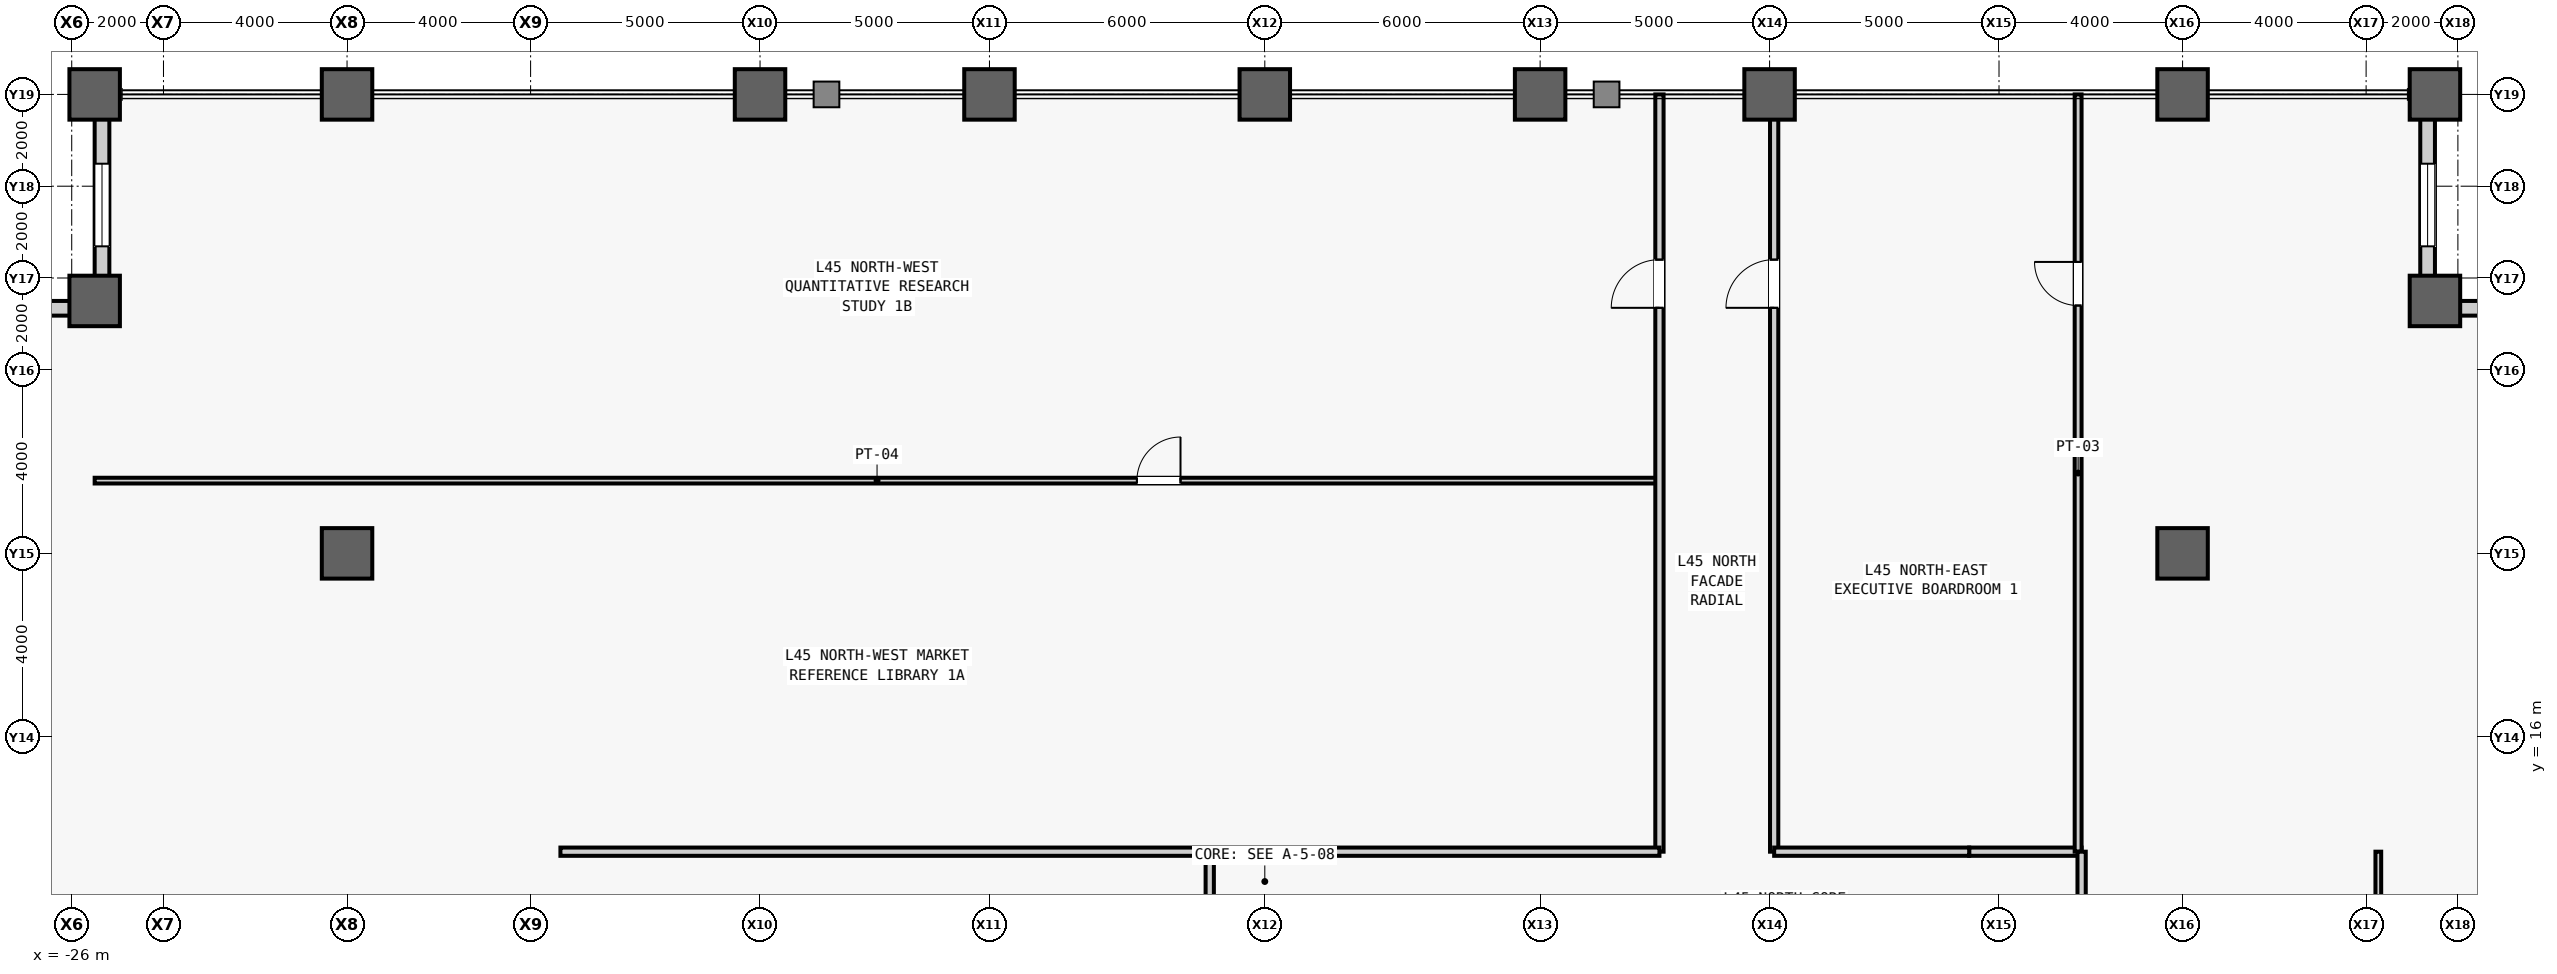
"""IFC4 building model, lengths in metres.
Left out: names, types, materials, properties, quantities, classifications, styles, units other than length and angle.
Written with IfcOpenShell. Run it as: python <this file> out.ifc"""

import sys

from ifc_helpers import new_model, si_unit, direction, frame, frame_2d, origin, origin_2d, place, context, subcontext, project, spatial, rectangle, hollow_rectangle, extrude, source, transform, mapped, element, fill, save


model = new_model("IFC4")
c1 = context("Model", 3, precision=1e-05, world=origin(), true_north=direction((0.0, 1.0)))
c2 = subcontext(c1, "Body", "Model", "MODEL_VIEW")
j1 = project(units=[si_unit("LENGTHUNIT", "METRE"), si_unit("PLANEANGLEUNIT", "RADIAN")], contexts=[c1])
p1 = place(None, origin())
s1 = spatial("IfcSite", under=j1, at=p1, CompositionType="ELEMENT")
p2 = place(p1, origin())
s2 = spatial("IfcBuilding", under=s1, at=p2, CompositionType="ELEMENT")
p3 = place(p2, frame((0.0, 0.0, 195.1)))
s3 = spatial("IfcBuildingStorey", under=s2, at=p3, CompositionType="ELEMENT", Elevation=195.1)
m1 = source(origin(), c2, "Body", "SweptSolid", [
    extrude(hollow_rectangle(XDim=1.1, YDim=1.1, WallThickness=0.06, at=origin_2d()), origin(), (0.0, 0.0, 1.0), 4.0),
])
for number, where, z_axis, x_axis in (
    (1, (-25.5, 25.5, 0.0), (0.0, 0.0, 1.0), (1.0, 0.0, 0.0)),
    (2, (-25.5, 30.0, 0.0), (0.0, 0.0, 1.0), (1.0, 0.0, 0.0)),
    (3, (-20.0, 20.0, 0.0), (0.0, 0.0, 1.0), (1.0, 0.0, 0.0)),
    (4, (-20.0, 30.0, 0.0), (0.0, 0.0, 1.0), (1.0, 0.0, 0.0)),
    (5, (-11.0, 30.0, 0.0), (0.0, 0.0, 1.0), (1.0, 0.0, 0.0)),
    (6, (-6.0, 30.0, 0.0), (0.0, 0.0, 1.0), (1.0, 0.0, 0.0)),
    (7, (0.0, 30.0, 0.0), (0.0, 0.0, 1.0), (1.0, 0.0, 0.0)),
    (8, (6.0, 30.0, 0.0), (0.0, 0.0, 1.0), (1.0, 0.0, 0.0)),
    (9, (11.0, 30.0, 0.0), (0.0, 0.0, 1.0), (1.0, 0.0, 0.0)),
    (10, (20.0, 20.0, 0.0), (0.0, 0.0, 1.0), (1.0, 0.0, 0.0)),
    (11, (20.0, 30.0, 0.0), (0.0, 0.0, 1.0), (1.0, 0.0, 0.0)),
    (12, (25.5, 25.5, 0.0), (0.0, 0.0, 1.0), (1.0, 0.0, 0.0)),
    (13, (25.5, 30.0, 0.0), (0.0, 0.0, 1.0), (1.0, 0.0, 0.0)),
):
    element("IfcColumn", number, at=place(p3, frame(where, z_axis=z_axis, x_axis=x_axis)), inside=s3, PredefinedType="COLUMN", context=c2, shape_type="MappedRepresentation", body=[
        mapped(m1, transform((0.0, 0.0, 0.0), scale=1.0)),
    ])
m2 = source(origin(), c2, "Body", "SweptSolid", [
    extrude(rectangle(XDim=4.18, YDim=0.32, at=frame_2d((2.09, 0.0))), origin(), (0.0, 0.0, 1.0), 3.164),
])
p4 = place(p3, frame((25.5, 25.34, 0.0), z_axis=(0.0, 0.0, 1.0), x_axis=(1.0, 0.0, 0.0)))
e14 = element("IfcWall", 14, at=p4, inside=s3, PredefinedType="STANDARD", context=c2, shape_type="MappedRepresentation", body=[
    mapped(m2, transform((0.0, 0.0, 0.0), scale=1.0)),
])
m3 = source(origin(), c2, "Body", "SweptSolid", [
    extrude(rectangle(XDim=1.8, YDim=2.4, at=frame_2d((0.9, 1.2))), frame((0.0, 0.17, 0.0), z_axis=(0.0, -1.0, 0.0), x_axis=(1.0, 0.0, 0.0)), (0.0, 0.0, 1.0), 0.34),
])
p5 = place(p4, frame((1.19, 0.0, 0.5)))
e15 = element("IfcOpeningElement", 15, at=p5, cuts=e14, PredefinedType="OPENING", context=c2, shape_type="MappedRepresentation", body=[
    mapped(m3, transform((0.0, 0.0, 0.0), scale=1.0)),
])
p6 = place(p3, frame((25.34, 25.5, 0.0), z_axis=(0.0, 0.0, 1.0), x_axis=(0.0, 1.0, 0.0)))
e16 = element("IfcWall", 16, at=p6, inside=s3, PredefinedType="STANDARD", context=c2, shape_type="MappedRepresentation", body=[
    mapped(m2, transform((0.0, 0.0, 0.0), scale=1.0)),
])
p7 = place(p6, frame((1.19, 0.0, 0.5)))
e17 = element("IfcOpeningElement", 17, at=p7, cuts=e16, PredefinedType="OPENING", context=c2, shape_type="MappedRepresentation", body=[
    mapped(m3, transform((0.0, 0.0, 0.0), scale=1.0)),
])
p8 = place(p3, frame((-25.34, 25.5, 0.0), z_axis=(0.0, 0.0, 1.0), x_axis=(0.0, 1.0, 0.0)))
e18 = element("IfcWall", 18, at=p8, inside=s3, PredefinedType="STANDARD", context=c2, shape_type="MappedRepresentation", body=[
    mapped(m2, transform((0.0, 0.0, 0.0), scale=1.0)),
])
p9 = place(p8, frame((1.19, 0.0, 0.5)))
e19 = element("IfcOpeningElement", 19, at=p9, cuts=e18, PredefinedType="OPENING", context=c2, shape_type="MappedRepresentation", body=[
    mapped(m3, transform((0.0, 0.0, 0.0), scale=1.0)),
])
p10 = place(p3, frame((-25.5, 25.34, 0.0), z_axis=(0.0, 0.0, 1.0), x_axis=(-1.0, 0.0, 0.0)))
e20 = element("IfcWall", 20, at=p10, inside=s3, PredefinedType="STANDARD", context=c2, shape_type="MappedRepresentation", body=[
    mapped(m2, transform((0.0, 0.0, 0.0), scale=1.0)),
])
p11 = place(p10, frame((1.19, 0.0, 0.5)))
e21 = element("IfcOpeningElement", 21, at=p11, cuts=e20, PredefinedType="OPENING", context=c2, shape_type="MappedRepresentation", body=[
    mapped(m3, transform((0.0, 0.0, 0.0), scale=1.0)),
])
m4 = source(origin(), c2, "Body", "SweptSolid", [
    extrude(rectangle(XDim=2.45, YDim=0.18, at=frame_2d((1.225, 0.0))), origin(), (0.0, 0.0, 1.0), 3.78),
])
p12 = place(p3, frame((15.35, 13.5, 0.0), z_axis=(0.0, 0.0, 1.0), x_axis=(1.0, 0.0, 0.0)))
e22 = element("IfcWall", 22, at=p12, inside=s3, PredefinedType="PARTITIONING", context=c2, shape_type="MappedRepresentation", body=[
    mapped(m4, transform((0.0, 0.0, 0.0), scale=1.0)),
])
m5 = source(origin(), c2, "Body", "SweptSolid", [
    extrude(rectangle(XDim=2.5, YDim=0.18, at=frame_2d((1.25, 0.0))), origin(), (0.0, 0.0, 1.0), 3.78),
])
p13 = place(p3, frame((-1.2, 11.0, 0.0), z_axis=(0.0, 0.0, 1.0), x_axis=(0.0, 1.0, 0.0)))
e23 = element("IfcWall", 23, at=p13, inside=s3, PredefinedType="PARTITIONING", context=c2, shape_type="MappedRepresentation", body=[
    mapped(m5, transform((0.0, 0.0, 0.0), scale=1.0)),
])
m6 = source(origin(), c2, "Body", "SweptSolid", [
    extrude(rectangle(XDim=34.1, YDim=0.125, at=frame_2d((17.05, 0.0))), origin(), (0.0, 0.0, 1.0), 3.78),
])
p14 = place(p3, frame((-25.5, 21.585, 0.0), z_axis=(0.0, 0.0, 1.0), x_axis=(1.0, 0.0, 0.0)))
e24 = element("IfcWall", 24, at=p14, inside=s3, PredefinedType="PARTITIONING", context=c2, shape_type="MappedRepresentation", body=[
    mapped(m6, transform((0.0, 0.0, 0.0), scale=1.0)),
])
m7 = source(origin(), c2, "Body", "SweptSolid", [
    extrude(rectangle(XDim=0.95, YDim=2.15, at=frame_2d((0.475, 1.075))), frame((0.0, 0.073, 0.0), z_axis=(0.0, -1.0, 0.0), x_axis=(1.0, 0.0, 0.0)), (0.0, 0.0, 1.0), 0.145),
])
p15 = place(p14, frame((22.713, 0.0, 0.0)))
e25 = element("IfcOpeningElement", 25, at=p15, cuts=e24, PredefinedType="OPENING", context=c2, shape_type="MappedRepresentation", body=[
    mapped(m7, transform((0.0, 0.0, 0.0), scale=1.0)),
])
m8 = source(origin(), c2, "Body", "SweptSolid", [
    extrude(rectangle(XDim=16.5, YDim=0.18, at=frame_2d((8.25, 0.0))), origin(), (0.0, 0.0, 1.0), 3.78),
])
p16 = place(p3, frame((8.6, 13.5, 0.0), z_axis=(0.0, 0.0, 1.0), x_axis=(0.0, 1.0, 0.0)))
e26 = element("IfcWall", 26, at=p16, inside=s3, PredefinedType="PARTITIONING", context=c2, shape_type="MappedRepresentation", body=[
    mapped(m8, transform((0.0, 0.0, 0.0), scale=1.0)),
])
m9 = source(origin(), c2, "Body", "SweptSolid", [
    extrude(rectangle(XDim=1.05, YDim=2.2, at=frame_2d((0.525, 1.1))), frame((0.0, 0.1, 0.0), z_axis=(0.0, -1.0, 0.0), x_axis=(1.0, 0.0, 0.0)), (0.0, 0.0, 1.0), 0.2),
])
p17 = place(p16, frame((11.85, 0.0, 0.0)))
e27 = element("IfcOpeningElement", 27, at=p17, cuts=e26, PredefinedType="OPENING", context=c2, shape_type="MappedRepresentation", body=[
    mapped(m9, transform((0.0, 0.0, 0.0), scale=1.0)),
])
m10 = source(origin(), c2, "Body", "SweptSolid", [
    extrude(rectangle(XDim=23.95, YDim=0.18, at=frame_2d((11.975, 0.0))), origin(), (0.0, 0.0, 1.0), 3.78),
])
p18 = place(p3, frame((-15.35, 13.5, 0.0), z_axis=(0.0, 0.0, 1.0), x_axis=(1.0, 0.0, 0.0)))
e28 = element("IfcWall", 28, at=p18, inside=s3, PredefinedType="PARTITIONING", context=c2, shape_type="MappedRepresentation", body=[
    mapped(m10, transform((0.0, 0.0, 0.0), scale=1.0)),
])
m11 = source(origin(), c2, "Body", "SweptSolid", [
    extrude(rectangle(XDim=16.5, YDim=0.15, at=frame_2d((8.25, 0.0))), origin(), (0.0, 0.0, 1.0), 3.78),
])
p19 = place(p3, frame((17.724, 13.5, 0.0), z_axis=(0.0, 0.0, 1.0), x_axis=(0.0, 1.0, 0.0)))
e29 = element("IfcWall", 29, at=p19, inside=s3, PredefinedType="PARTITIONING", context=c2, shape_type="MappedRepresentation", body=[
    mapped(m11, transform((0.0, 0.0, 0.0), scale=1.0)),
])
m12 = source(origin(), c2, "Body", "SweptSolid", [
    extrude(rectangle(XDim=0.95, YDim=2.15, at=frame_2d((0.475, 1.075))), frame((0.0, 0.085, 0.0), z_axis=(0.0, -1.0, 0.0), x_axis=(1.0, 0.0, 0.0)), (0.0, 0.0, 1.0), 0.17),
])
p20 = place(p19, frame((11.9, 0.0, 0.0)))
e30 = element("IfcOpeningElement", 30, at=p20, cuts=e29, PredefinedType="OPENING", context=c2, shape_type="MappedRepresentation", body=[
    mapped(m12, transform((0.0, 0.0, 0.0), scale=1.0)),
])
m13 = source(origin(), c2, "Body", "SweptSolid", [
    extrude(rectangle(XDim=16.5, YDim=0.18, at=frame_2d((8.25, 0.0))), origin(), (0.0, 0.0, 1.0), 3.007),
])
p21 = place(p3, frame((11.1, 13.5, 0.0), z_axis=(0.0, 0.0, 1.0), x_axis=(0.0, 1.0, 0.0)))
e31 = element("IfcWall", 31, at=p21, inside=s3, PredefinedType="PARTITIONING", context=c2, shape_type="MappedRepresentation", body=[
    mapped(m13, transform((0.0, 0.0, 0.0), scale=1.0)),
])
p22 = place(p21, frame((11.85, 0.0, 0.0)))
e32 = element("IfcOpeningElement", 32, at=p22, cuts=e31, PredefinedType="OPENING", context=c2, shape_type="MappedRepresentation", body=[
    mapped(m9, transform((0.0, 0.0, 0.0), scale=1.0)),
])
m14 = source(origin(), c2, "Body", "SweptSolid", [
    extrude(rectangle(XDim=4.25, YDim=0.18, at=frame_2d((2.125, 0.0))), origin(), (0.0, 0.0, 1.0), 3.78),
])
p23 = place(p3, frame((11.1, 13.5, 0.0), z_axis=(0.0, 0.0, 1.0), x_axis=(1.0, 0.0, 0.0)))
e33 = element("IfcWall", 33, at=p23, inside=s3, PredefinedType="PARTITIONING", context=c2, shape_type="MappedRepresentation", body=[
    mapped(m14, transform((0.0, 0.0, 0.0), scale=1.0)),
])
m15 = source(origin(), c2, "Body", "SweptSolid", [
    extrude(rectangle(XDim=8.35, YDim=0.125, at=frame_2d((4.175, 0.0))), origin(), (0.0, 0.0, 1.0), 3.78),
])
p24 = place(p3, frame((24.266, 5.15, 0.0), z_axis=(0.0, 0.0, 1.0), x_axis=(0.0, 1.0, 0.0)))
e34 = element("IfcWall", 34, at=p24, inside=s3, PredefinedType="PARTITIONING", context=c2, shape_type="MappedRepresentation", body=[
    mapped(m15, transform((0.0, 0.0, 0.0), scale=1.0)),
])
m16 = source(origin(), c2, "Body", "SweptSolid", [
    extrude(rectangle(XDim=8.35, YDim=0.18, at=frame_2d((4.175, 0.0))), origin(), (0.0, 0.0, 1.0), 3.78),
])
p25 = place(p3, frame((17.8, 5.15, 0.0), z_axis=(0.0, 0.0, 1.0), x_axis=(0.0, 1.0, 0.0)))
e35 = element("IfcWall", 35, at=p25, inside=s3, PredefinedType="PARTITIONING", context=c2, shape_type="MappedRepresentation", body=[
    mapped(m16, transform((0.0, 0.0, 0.0), scale=1.0)),
])
m17 = source(origin(), c2, "Body", "SweptSolid", [
    extrude(rectangle(XDim=1.8, YDim=2.4, at=frame_2d((0.9, 1.2))), frame((0.0, 0.03, 0.0), z_axis=(0.0, -1.0, 0.0), x_axis=(1.0, 0.0, 0.0)), (0.0, 0.0, 1.0), 0.06),
])
p26 = place(p7, origin())
e36 = element("IfcWindow", 36, at=p26, inside=s3, PartitioningType="SINGLE_PANEL", PredefinedType="WINDOW", context=c2, shape_type="MappedRepresentation", body=[
    mapped(m17, transform((0.0, 0.0, 0.0), scale=1.0)),
])
fill(e17, e36)
p27 = place(p9, origin())
e37 = element("IfcWindow", 37, at=p27, inside=s3, PartitioningType="SINGLE_PANEL", PredefinedType="WINDOW", context=c2, shape_type="MappedRepresentation", body=[
    mapped(m17, transform((0.0, 0.0, 0.0), scale=1.0)),
])
fill(e19, e37)
m18 = source(origin(), c2, "Body", "SweptSolid", [
    extrude(rectangle(XDim=0.95, YDim=2.15, at=frame_2d((0.475, 1.075))), frame((0.0, 0.025, 0.0), z_axis=(0.0, -1.0, 0.0), x_axis=(1.0, 0.0, 0.0)), (0.0, 0.0, 1.0), 0.05),
])
p28 = place(p15, origin())
e38 = element("IfcDoor", 38, at=p28, inside=s3, OperationType="SINGLE_SWING_RIGHT", PredefinedType="DOOR", context=c2, shape_type="MappedRepresentation", body=[
    mapped(m18, transform((0.0, 0.0, 0.0), scale=1.0)),
])
fill(e25, e38)
m19 = source(origin(), c2, "Body", "SweptSolid", [
    extrude(rectangle(XDim=1.05, YDim=2.2, at=frame_2d((0.525, 1.1))), frame((0.0, 0.025, 0.0), z_axis=(0.0, -1.0, 0.0), x_axis=(1.0, 0.0, 0.0)), (0.0, 0.0, 1.0), 0.05),
])
p29 = place(p17, origin())
e39 = element("IfcDoor", 39, at=p29, inside=s3, OperationType="SINGLE_SWING_LEFT", PredefinedType="DOOR", context=c2, shape_type="MappedRepresentation", body=[
    mapped(m19, transform((0.0, 0.0, 0.0), scale=1.0)),
])
fill(e27, e39)
p30 = place(p20, origin())
e40 = element("IfcDoor", 40, at=p30, inside=s3, OperationType="SINGLE_SWING_RIGHT", PredefinedType="DOOR", context=c2, shape_type="MappedRepresentation", body=[
    mapped(m18, transform((0.0, 0.0, 0.0), scale=1.0)),
])
fill(e30, e40)
p31 = place(p22, origin())
e41 = element("IfcDoor", 41, at=p31, inside=s3, OperationType="SINGLE_SWING_LEFT", PredefinedType="DOOR", context=c2, shape_type="MappedRepresentation", body=[
    mapped(m19, transform((0.0, 0.0, 0.0), scale=1.0)),
])
fill(e32, e41)
save(model, sys.argv[1])
